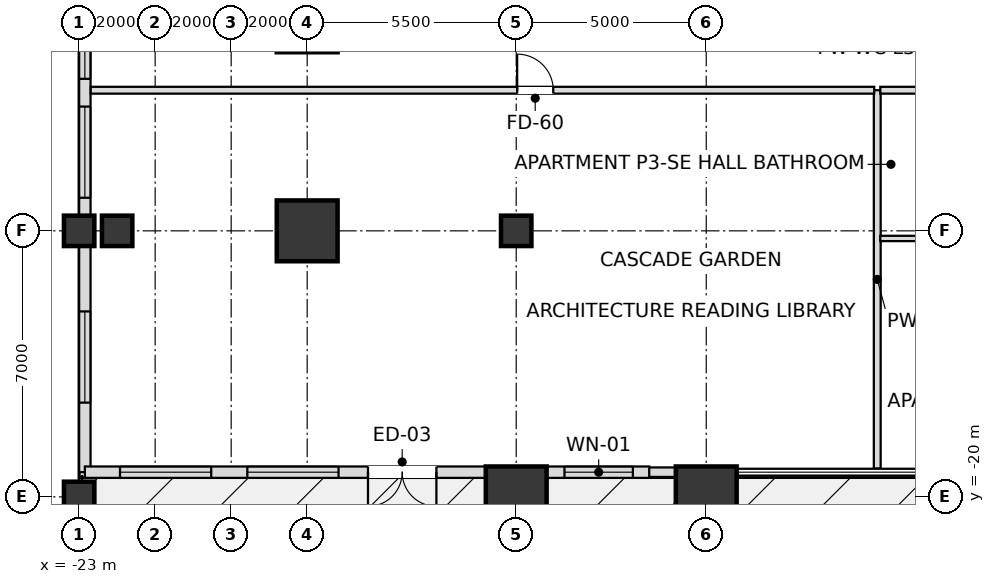
"""IFC4 building model, lengths in metres.
Left out: names, types, materials, properties, quantities, classifications, styles, units other than length and angle.
Written with IfcOpenShell. Run it as: python <this file> out.ifc"""

import sys

from ifc_helpers import new_model, si_unit, direction, frame, frame_2d, origin, origin_2d, place, context, subcontext, project, spatial, rectangle, extrude, element, fill, save


model = new_model("IFC4")
c1 = context("Model", 3, precision=1e-05, world=origin(), true_north=direction((0.0, 1.0)))
c2 = subcontext(c1, "Body", "Model", "MODEL_VIEW")
j1 = project(units=[si_unit("LENGTHUNIT", "METRE"), si_unit("PLANEANGLEUNIT", "RADIAN")], contexts=[c1])
p1 = place(None, origin())
s1 = spatial("IfcSite", under=j1, at=p1, CompositionType="ELEMENT")
p2 = place(p1, origin())
s2 = spatial("IfcBuilding", under=s1, at=p2, CompositionType="ELEMENT")
p3 = place(p2, frame((0.0, 0.0, 16.8)))
s3 = spatial("IfcBuildingStorey", under=s2, at=p3, CompositionType="ELEMENT", Elevation=16.8)
for number, where, z_axis, x_axis in (
    (1, (-11.5, -20.0, 0.0), (0.0, 0.0, 1.0), (1.0, 0.0, 0.0)),
    (2, (-6.5, -20.0, 0.0), (0.0, 0.0, 1.0), (1.0, 0.0, 0.0)),
    (3, (-17.0, -13.0, 0.0), (0.0, 0.0, 1.0), (1.0, 0.0, 0.0)),
):
    element("IfcColumn", number, at=place(p3, frame(where, z_axis=z_axis, x_axis=x_axis)), inside=s3, PredefinedType="USERDEFINED", context=c2, shape_type="SweptSolid", body=[
        extrude(rectangle(XDim=1.6, YDim=1.6, at=origin_2d()), origin(), (0.0, 0.0, 1.0), 5.4),
    ])
for number, where, z_axis, x_axis in (
    (4, (-23.0, -20.0, 0.0), (0.0, 0.0, 1.0), (1.0, 0.0, 0.0)),
    (5, (-23.0, -13.0, 0.0), (0.0, 0.0, 1.0), (1.0, 0.0, 0.0)),
    (6, (-11.5, -13.0, 0.0), (0.0, 0.0, 1.0), (1.0, 0.0, 0.0)),
    (7, (-22.0, -13.0, 0.0), (0.0, 0.0, 1.0), (1.0, 0.0, 0.0)),
):
    element("IfcColumn", number, at=place(p3, frame(where, z_axis=z_axis, x_axis=x_axis)), inside=s3, PredefinedType="COLUMN", context=c2, shape_type="SweptSolid", body=[
        extrude(rectangle(XDim=0.8, YDim=0.8, at=origin_2d()), origin(), (0.0, 0.0, 1.0), 5.4),
    ])
p4 = place(p3, frame((-22.85, 19.35, 0.0), z_axis=(0.0, 0.0, 1.0), x_axis=(0.0, -1.0, 0.0)))
e8 = element("IfcWall", 8, at=p4, inside=s3, PredefinedType="SOLIDWALL", context=c2, shape_type="SweptSolid", body=[
    extrude(rectangle(XDim=38.7, YDim=0.3, at=frame_2d((19.35, 0.0))), origin(), (0.0, 0.0, 1.0), 4.476),
])
p5 = place(p4, frame((1.83, 0.0, 0.8)))
e9 = element("IfcOpeningElement", 9, at=p5, cuts=e8, PredefinedType="OPENING", context=c2, shape_type="SweptSolid", body=[
    extrude(rectangle(XDim=2.4, YDim=2.2, at=frame_2d((1.2, 1.1))), frame((0.0, 0.16, 0.0), z_axis=(0.0, -1.0, 0.0), x_axis=(1.0, 0.0, 0.0)), (0.0, 0.0, 1.0), 0.32),
])
p6 = place(p4, frame((7.22, 0.0, 0.8)))
e10 = element("IfcOpeningElement", 10, at=p6, cuts=e8, PredefinedType="OPENING", context=c2, shape_type="SweptSolid", body=[
    extrude(rectangle(XDim=2.4, YDim=2.2, at=frame_2d((1.2, 1.1))), frame((0.0, 0.16, 0.0), z_axis=(0.0, -1.0, 0.0), x_axis=(1.0, 0.0, 0.0)), (0.0, 0.0, 1.0), 0.32),
])
p7 = place(p4, frame((10.35, 0.0, 0.72)))
e11 = element("IfcOpeningElement", 11, at=p7, cuts=e8, PredefinedType="OPENING", context=c2, shape_type="SweptSolid", body=[
    extrude(rectangle(XDim=1.2, YDim=1.68, at=frame_2d((0.6, 0.84))), frame((0.0, 0.16, 0.0), z_axis=(0.0, -1.0, 0.0), x_axis=(1.0, 0.0, 0.0)), (0.0, 0.0, 1.0), 0.32),
])
p8 = place(p4, frame((12.495, 0.0, 0.8)))
e12 = element("IfcOpeningElement", 12, at=p8, cuts=e8, PredefinedType="OPENING", context=c2, shape_type="SweptSolid", body=[
    extrude(rectangle(XDim=2.4, YDim=2.2, at=frame_2d((1.2, 1.1))), frame((0.0, 0.16, 0.0), z_axis=(0.0, -1.0, 0.0), x_axis=(1.0, 0.0, 0.0)), (0.0, 0.0, 1.0), 0.32),
])
p9 = place(p4, frame((15.865, 0.0, 0.8)))
e13 = element("IfcOpeningElement", 13, at=p9, cuts=e8, PredefinedType="OPENING", context=c2, shape_type="SweptSolid", body=[
    extrude(rectangle(XDim=2.4, YDim=2.2, at=frame_2d((1.2, 1.1))), frame((0.0, 0.16, 0.0), z_axis=(0.0, -1.0, 0.0), x_axis=(1.0, 0.0, 0.0)), (0.0, 0.0, 1.0), 0.32),
])
p10 = place(p4, frame((20.435, 0.0, 0.8)))
e14 = element("IfcOpeningElement", 14, at=p10, cuts=e8, PredefinedType="OPENING", context=c2, shape_type="SweptSolid", body=[
    extrude(rectangle(XDim=2.4, YDim=2.2, at=frame_2d((1.2, 1.1))), frame((0.0, 0.16, 0.0), z_axis=(0.0, -1.0, 0.0), x_axis=(1.0, 0.0, 0.0)), (0.0, 0.0, 1.0), 0.32),
])
p11 = place(p4, frame((23.805, 0.0, 0.8)))
e15 = element("IfcOpeningElement", 15, at=p11, cuts=e8, PredefinedType="OPENING", context=c2, shape_type="SweptSolid", body=[
    extrude(rectangle(XDim=2.4, YDim=2.2, at=frame_2d((1.2, 1.1))), frame((0.0, 0.16, 0.0), z_axis=(0.0, -1.0, 0.0), x_axis=(1.0, 0.0, 0.0)), (0.0, 0.0, 1.0), 0.32),
])
p12 = place(p4, frame((27.15, 0.0, 0.72)))
e16 = element("IfcOpeningElement", 16, at=p12, cuts=e8, PredefinedType="OPENING", context=c2, shape_type="SweptSolid", body=[
    extrude(rectangle(XDim=1.2, YDim=1.68, at=frame_2d((0.6, 0.84))), frame((0.0, 0.16, 0.0), z_axis=(0.0, -1.0, 0.0), x_axis=(1.0, 0.0, 0.0)), (0.0, 0.0, 1.0), 0.32),
])
p13 = place(p4, frame((29.08, 0.0, 0.8)))
e17 = element("IfcOpeningElement", 17, at=p13, cuts=e8, PredefinedType="OPENING", context=c2, shape_type="SweptSolid", body=[
    extrude(rectangle(XDim=2.4, YDim=2.2, at=frame_2d((1.2, 1.1))), frame((0.0, 0.16, 0.0), z_axis=(0.0, -1.0, 0.0), x_axis=(1.0, 0.0, 0.0)), (0.0, 0.0, 1.0), 0.32),
])
p14 = place(p4, frame((34.47, 0.0, 0.8)))
e18 = element("IfcOpeningElement", 18, at=p14, cuts=e8, PredefinedType="OPENING", context=c2, shape_type="SweptSolid", body=[
    extrude(rectangle(XDim=2.4, YDim=2.2, at=frame_2d((1.2, 1.1))), frame((0.0, 0.16, 0.0), z_axis=(0.0, -1.0, 0.0), x_axis=(1.0, 0.0, 0.0)), (0.0, 0.0, 1.0), 0.32),
])
p15 = place(p3, frame((-8.025, -19.35, 0.0), z_axis=(0.0, 0.0, 1.0), x_axis=(1.0, 0.0, 0.0)))
e19 = element("IfcWall", 19, at=p15, inside=s3, PredefinedType="SOLIDWALL", context=c2, shape_type="SweptSolid", body=[
    extrude(rectangle(XDim=0.73, YDim=0.25, at=frame_2d((0.365, 0.0))), origin(), (0.0, 0.0, 1.0), 5.12),
])
p16 = place(p3, frame((-8.0, -19.35, 0.0), z_axis=(0.0, 0.0, 1.0), x_axis=(-1.0, 0.0, 0.0)))
e20 = element("IfcWall", 20, at=p16, inside=s3, PredefinedType="SOLIDWALL", context=c2, shape_type="SweptSolid", body=[
    extrude(rectangle(XDim=14.85, YDim=0.3, at=frame_2d((7.425, 0.0))), origin(), (0.0, 0.0, 1.0), 5.12),
])
p17 = place(p16, frame((5.6, 0.0, 0.0)))
e21 = element("IfcOpeningElement", 21, at=p17, cuts=e20, PredefinedType="OPENING", context=c2, shape_type="SweptSolid", body=[
    extrude(rectangle(XDim=1.8, YDim=2.3, at=frame_2d((0.9, 1.15))), frame((0.0, 0.16, 0.0), z_axis=(0.0, -1.0, 0.0), x_axis=(1.0, 0.0, 0.0)), (0.0, 0.0, 1.0), 0.32),
])
p18 = place(p16, frame((0.43, 0.0, 0.72)))
e22 = element("IfcOpeningElement", 22, at=p18, cuts=e20, PredefinedType="OPENING", context=c2, shape_type="SweptSolid", body=[
    extrude(rectangle(XDim=1.8, YDim=1.68, at=frame_2d((0.9, 0.84))), frame((0.0, 0.16, 0.0), z_axis=(0.0, -1.0, 0.0), x_axis=(1.0, 0.0, 0.0)), (0.0, 0.0, 1.0), 0.32),
])
p19 = place(p16, frame((8.175, 0.0, 0.8)))
e23 = element("IfcOpeningElement", 23, at=p19, cuts=e20, PredefinedType="OPENING", context=c2, shape_type="SweptSolid", body=[
    extrude(rectangle(XDim=2.4, YDim=2.2, at=frame_2d((1.2, 1.1))), frame((0.0, 0.16, 0.0), z_axis=(0.0, -1.0, 0.0), x_axis=(1.0, 0.0, 0.0)), (0.0, 0.0, 1.0), 0.32),
])
p20 = place(p16, frame((11.525, 0.0, 0.8)))
e24 = element("IfcOpeningElement", 24, at=p20, cuts=e20, PredefinedType="OPENING", context=c2, shape_type="SweptSolid", body=[
    extrude(rectangle(XDim=2.4, YDim=2.2, at=frame_2d((1.2, 1.1))), frame((0.0, 0.16, 0.0), z_axis=(0.0, -1.0, 0.0), x_axis=(1.0, 0.0, 0.0)), (0.0, 0.0, 1.0), 0.32),
])
p21 = place(p3, frame((-2.0, -19.255, 0.0), z_axis=(0.0, 0.0, 1.0), x_axis=(0.0, 1.0, 0.0)))
e25 = element("IfcWall", 25, at=p21, inside=s3, PredefinedType="PARTITIONING", context=c2, shape_type="SweptSolid", body=[
    extrude(rectangle(XDim=9.955, YDim=0.18, at=frame_2d((4.978, 0.0))), origin(), (0.0, 0.0, 1.0), 4.642),
])
p22 = place(p3, frame((-1.92, -13.2, 0.0), z_axis=(0.0, 0.0, 1.0), x_axis=(1.0, 0.0, 0.0)))
e26 = element("IfcWall", 26, at=p22, inside=s3, PredefinedType="PARTITIONING", context=c2, shape_type="SweptSolid", body=[
    extrude(rectangle(XDim=1.79, YDim=0.14, at=frame_2d((0.895, 0.0))), origin(), (0.0, 0.0, 1.0), 5.12),
])
p23 = place(p3, frame((-22.695, -9.3, 0.0), z_axis=(0.0, 0.0, 1.0), x_axis=(1.0, 0.0, 0.0)))
e27 = element("IfcWall", 27, at=p23, inside=s3, PredefinedType="PARTITIONING", context=c2, shape_type="SweptSolid", body=[
    extrude(rectangle(XDim=20.615, YDim=0.18, at=frame_2d((10.308, 0.0))), origin(), (0.0, 0.0, 1.0), 4.41),
])
p24 = place(p23, frame((11.22, 0.0, 0.0)))
e28 = element("IfcOpeningElement", 28, at=p24, cuts=e27, PredefinedType="OPENING", context=c2, shape_type="SweptSolid", body=[
    extrude(rectangle(XDim=0.95, YDim=2.15, at=frame_2d((0.475, 1.075))), frame((0.0, 0.1, 0.0), z_axis=(0.0, -1.0, 0.0), x_axis=(1.0, 0.0, 0.0)), (0.0, 0.0, 1.0), 0.2),
])
p25 = place(p3, frame((-1.92, -9.3, 0.0), z_axis=(0.0, 0.0, 1.0), x_axis=(1.0, 0.0, 0.0)))
e29 = element("IfcWall", 29, at=p25, inside=s3, PredefinedType="PARTITIONING", context=c2, shape_type="SweptSolid", body=[
    extrude(rectangle(XDim=1.79, YDim=0.18, at=frame_2d((0.895, 0.0))), origin(), (0.0, 0.0, 1.0), 5.12),
])
p26 = place(p12, origin())
e30 = element("IfcWindow", 30, at=p26, inside=s3, PartitioningType="SINGLE_PANEL", PredefinedType="WINDOW", context=c2, shape_type="SweptSolid", body=[
    extrude(rectangle(XDim=1.2, YDim=1.68, at=frame_2d((0.6, 0.84))), frame((0.0, 0.03, 0.0), z_axis=(0.0, -1.0, 0.0), x_axis=(1.0, 0.0, 0.0)), (0.0, 0.0, 1.0), 0.06),
])
fill(e16, e30)
p27 = place(p13, origin())
e31 = element("IfcWindow", 31, at=p27, inside=s3, PartitioningType="SINGLE_PANEL", PredefinedType="WINDOW", context=c2, shape_type="SweptSolid", body=[
    extrude(rectangle(XDim=2.4, YDim=2.2, at=frame_2d((1.2, 1.1))), frame((0.0, 0.03, 0.0), z_axis=(0.0, -1.0, 0.0), x_axis=(1.0, 0.0, 0.0)), (0.0, 0.0, 1.0), 0.06),
])
fill(e17, e31)
p28 = place(p14, origin())
e32 = element("IfcWindow", 32, at=p28, inside=s3, PartitioningType="SINGLE_PANEL", PredefinedType="WINDOW", context=c2, shape_type="SweptSolid", body=[
    extrude(rectangle(XDim=2.4, YDim=2.2, at=frame_2d((1.2, 1.1))), frame((0.0, 0.03, 0.0), z_axis=(0.0, -1.0, 0.0), x_axis=(1.0, 0.0, 0.0)), (0.0, 0.0, 1.0), 0.06),
])
fill(e18, e32)
p29 = place(p17, origin())
e33 = element("IfcDoor", 33, at=p29, inside=s3, OperationType="DOUBLE_DOOR_SINGLE_SWING", PredefinedType="DOOR", context=c2, shape_type="SweptSolid", body=[
    extrude(rectangle(XDim=1.8, YDim=2.3, at=frame_2d((0.9, 1.15))), frame((0.0, 0.025, 0.0), z_axis=(0.0, -1.0, 0.0), x_axis=(1.0, 0.0, 0.0)), (0.0, 0.0, 1.0), 0.05),
])
fill(e21, e33)
p30 = place(p18, origin())
e34 = element("IfcWindow", 34, at=p30, inside=s3, PartitioningType="SINGLE_PANEL", PredefinedType="WINDOW", context=c2, shape_type="SweptSolid", body=[
    extrude(rectangle(XDim=1.8, YDim=1.68, at=frame_2d((0.9, 0.84))), frame((0.0, 0.03, 0.0), z_axis=(0.0, -1.0, 0.0), x_axis=(1.0, 0.0, 0.0)), (0.0, 0.0, 1.0), 0.06),
])
fill(e22, e34)
p31 = place(p19, origin())
e35 = element("IfcWindow", 35, at=p31, inside=s3, PartitioningType="SINGLE_PANEL", PredefinedType="WINDOW", context=c2, shape_type="SweptSolid", body=[
    extrude(rectangle(XDim=2.4, YDim=2.2, at=frame_2d((1.2, 1.1))), frame((0.0, 0.03, 0.0), z_axis=(0.0, -1.0, 0.0), x_axis=(1.0, 0.0, 0.0)), (0.0, 0.0, 1.0), 0.06),
])
fill(e23, e35)
p32 = place(p20, origin())
e36 = element("IfcWindow", 36, at=p32, inside=s3, PartitioningType="SINGLE_PANEL", PredefinedType="WINDOW", context=c2, shape_type="SweptSolid", body=[
    extrude(rectangle(XDim=2.4, YDim=2.2, at=frame_2d((1.2, 1.1))), frame((0.0, 0.03, 0.0), z_axis=(0.0, -1.0, 0.0), x_axis=(1.0, 0.0, 0.0)), (0.0, 0.0, 1.0), 0.06),
])
fill(e24, e36)
p33 = place(p24, origin())
e37 = element("IfcDoor", 37, at=p33, inside=s3, OperationType="SINGLE_SWING_LEFT", PredefinedType="DOOR", context=c2, shape_type="SweptSolid", body=[
    extrude(rectangle(XDim=0.95, YDim=2.15, at=frame_2d((0.475, 1.075))), frame((0.0, 0.025, 0.0), z_axis=(0.0, -1.0, 0.0), x_axis=(1.0, 0.0, 0.0)), (0.0, 0.0, 1.0), 0.05),
])
fill(e28, e37)
save(model, sys.argv[1])
